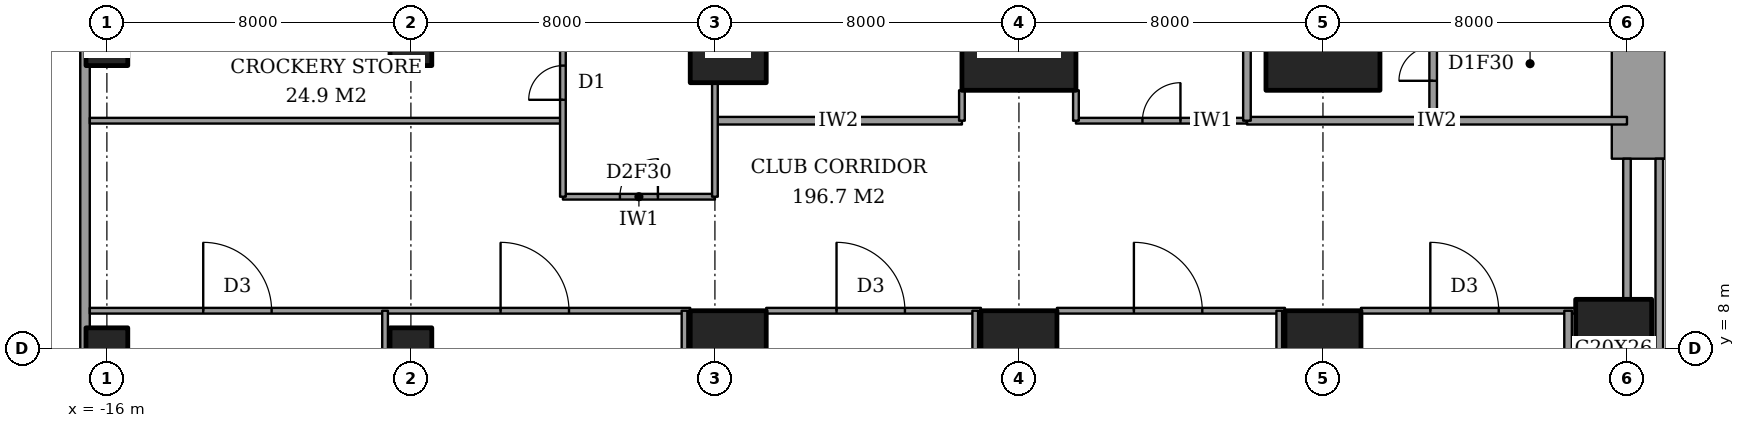
"""IFC4 building model, lengths in metres.
Left out: names, types, materials, properties, quantities, classifications, styles, units other than length and angle.
Written with IfcOpenShell. Run it as: python <this file> out.ifc"""

import sys

from ifc_helpers import new_model, si_unit, direction, frame, frame_2d, origin, origin_2d, place, context, subcontext, project, spatial, rectangle, extrude, element, fill, save


model = new_model("IFC4")
c1 = context("Model", 3, precision=1e-05, world=origin(), true_north=direction((0.0, 1.0)))
c2 = subcontext(c1, "Body", "Model", "MODEL_VIEW")
j1 = project(units=[si_unit("LENGTHUNIT", "METRE"), si_unit("PLANEANGLEUNIT", "RADIAN")], contexts=[c1])
p1 = place(None, origin())
s1 = spatial("IfcSite", under=j1, at=p1, CompositionType="ELEMENT")
p2 = place(p1, origin())
s2 = spatial("IfcBuilding", under=s1, at=p2, CompositionType="ELEMENT")
p3 = place(p2, frame((0.0, 0.0, 6.0)))
s3 = spatial("IfcBuildingStorey", under=s2, at=p3, CompositionType="ELEMENT", Elevation=6.0)
for number, where, z_axis, x_axis in (
    (1, (-16.0, 8.0, 0.0), (0.0, 0.0, 1.0), (1.0, 0.0, 0.0)),
    (2, (-16.0, 16.0, 0.0), (0.0, 0.0, 1.0), (1.0, 0.0, 0.0)),
    (3, (-8.0, 8.0, 0.0), (0.0, 0.0, 1.0), (1.0, 0.0, 0.0)),
    (4, (-8.0, 16.0, 0.0), (0.0, 0.0, 1.0), (1.0, 0.0, 0.0)),
):
    element("IfcColumn", number, at=place(p3, frame(where, z_axis=z_axis, x_axis=x_axis)), inside=s3, PredefinedType="COLUMN", context=c2, shape_type="SweptSolid", body=[
        extrude(rectangle(XDim=1.1, YDim=1.1, at=origin_2d()), origin(), (0.0, 0.0, 1.0), 5.0),
    ])
for number, where, z_axis, x_axis in (
    (5, (0.35, 8.0, 0.0), (0.0, 0.0, 1.0), (1.0, 0.0, 0.0)),
    (6, (0.35, 16.0, 0.0), (0.0, 0.0, 1.0), (1.0, 0.0, 0.0)),
    (7, (8.0, 8.0, 0.0), (0.0, 0.0, 1.0), (1.0, 0.0, 0.0)),
):
    element("IfcColumn", number, at=place(p3, frame(where, z_axis=z_axis, x_axis=x_axis)), inside=s3, PredefinedType="COLUMN", context=c2, shape_type="SweptSolid", body=[
        extrude(rectangle(XDim=2.0, YDim=2.0, at=origin_2d()), origin(), (0.0, 0.0, 1.0), 5.0),
    ])
p4 = place(p3, frame((8.0, 16.0, 0.0), z_axis=(0.0, 0.0, 1.0), x_axis=(1.0, 0.0, 0.0)))
e8 = element("IfcColumn", 8, at=p4, inside=s3, PredefinedType="COLUMN", context=c2, shape_type="SweptSolid", body=[
    extrude(rectangle(XDim=3.0, YDim=2.4, at=origin_2d()), origin(), (0.0, 0.0, 1.0), 5.0),
])
p5 = place(p3, frame((16.0, 8.0, 0.0), z_axis=(0.0, 0.0, 1.0), x_axis=(1.0, 0.0, 0.0)))
e9 = element("IfcColumn", 9, at=p5, inside=s3, PredefinedType="COLUMN", context=c2, shape_type="SweptSolid", body=[
    extrude(rectangle(XDim=2.0, YDim=2.0, at=origin_2d()), origin(), (0.0, 0.0, 1.0), 5.0),
])
p6 = place(p3, frame((16.0, 16.0, 0.0), z_axis=(0.0, 0.0, 1.0), x_axis=(1.0, 0.0, 0.0)))
e10 = element("IfcColumn", 10, at=p6, inside=s3, PredefinedType="COLUMN", context=c2, shape_type="SweptSolid", body=[
    extrude(rectangle(XDim=3.0, YDim=2.4, at=origin_2d()), origin(), (0.0, 0.0, 1.0), 5.0),
])
p7 = place(p3, frame((23.65, 8.0, 0.0), z_axis=(0.0, 0.0, 1.0), x_axis=(1.0, 0.0, 0.0)))
e11 = element("IfcColumn", 11, at=p7, inside=s3, PredefinedType="COLUMN", context=c2, shape_type="SweptSolid", body=[
    extrude(rectangle(XDim=2.0, YDim=2.6, at=origin_2d()), origin(), (0.0, 0.0, 1.0), 5.0),
])
p8 = place(p3, frame((24.3, 13.0, 0.0), z_axis=(0.0, 0.0, 1.0), x_axis=(0.0, 1.0, 0.0)))
e12 = element("IfcWall", 12, at=p8, inside=s3, PredefinedType="SHEAR", context=c2, shape_type="SweptSolid", body=[
    extrude(rectangle(XDim=10.15, YDim=1.4, at=frame_2d((5.075, 0.0))), origin(), (0.0, 0.0, 1.0), 5.0),
])
p9 = place(p3, frame((-16.575, 56.575, 0.0), z_axis=(0.0, 0.0, 1.0), x_axis=(0.0, -1.0, 0.0)))
e13 = element("IfcWall", 13, at=p9, inside=s3, PredefinedType="SOLIDWALL", context=c2, shape_type="SweptSolid", body=[
    extrude(rectangle(XDim=73.15, YDim=0.25, at=frame_2d((36.575, 0.0))), origin(), (0.0, 0.0, 1.0), 5.0),
])
p10 = place(p3, frame((-16.45, 9.0, 0.0), z_axis=(0.0, 0.0, 1.0), x_axis=(1.0, 0.0, 0.0)))
e14 = element("IfcWall", 14, at=p10, inside=s3, PredefinedType="PARTITIONING", context=c2, shape_type="SweptSolid", body=[
    extrude(rectangle(XDim=15.8, YDim=0.15, at=frame_2d((7.9, 0.0))), origin(), (0.0, 0.0, 1.0), 4.7),
])
p11 = place(p10, frame((2.985, 0.0, 0.0)))
e15 = element("IfcOpeningElement", 15, at=p11, cuts=e14, PredefinedType="OPENING", context=c2, shape_type="SweptSolid", body=[
    extrude(rectangle(XDim=1.8, YDim=2.1, at=frame_2d((0.9, 1.05))), frame((0.0, 0.085, 0.0), z_axis=(0.0, -1.0, 0.0), x_axis=(1.0, 0.0, 0.0)), (0.0, 0.0, 1.0), 0.17),
])
p12 = place(p10, frame((10.81, 0.0, 0.0)))
e16 = element("IfcOpeningElement", 16, at=p12, cuts=e14, PredefinedType="OPENING", context=c2, shape_type="SweptSolid", body=[
    extrude(rectangle(XDim=1.8, YDim=2.1, at=frame_2d((0.9, 1.05))), frame((0.0, 0.085, 0.0), z_axis=(0.0, -1.0, 0.0), x_axis=(1.0, 0.0, 0.0)), (0.0, 0.0, 1.0), 0.17),
])
p13 = place(p3, frame((1.35, 9.0, 0.0), z_axis=(0.0, 0.0, 1.0), x_axis=(1.0, 0.0, 0.0)))
e17 = element("IfcWall", 17, at=p13, inside=s3, PredefinedType="PARTITIONING", context=c2, shape_type="SweptSolid", body=[
    extrude(rectangle(XDim=5.65, YDim=0.15, at=frame_2d((2.825, 0.0))), origin(), (0.0, 0.0, 1.0), 4.7),
])
p14 = place(p13, frame((1.85, 0.0, 0.0)))
e18 = element("IfcOpeningElement", 18, at=p14, cuts=e17, PredefinedType="OPENING", context=c2, shape_type="SweptSolid", body=[
    extrude(rectangle(XDim=1.8, YDim=2.1, at=frame_2d((0.9, 1.05))), frame((0.0, 0.085, 0.0), z_axis=(0.0, -1.0, 0.0), x_axis=(1.0, 0.0, 0.0)), (0.0, 0.0, 1.0), 0.17),
])
p15 = place(p3, frame((9.0, 9.0, 0.0), z_axis=(0.0, 0.0, 1.0), x_axis=(1.0, 0.0, 0.0)))
e19 = element("IfcWall", 19, at=p15, inside=s3, PredefinedType="PARTITIONING", context=c2, shape_type="SweptSolid", body=[
    extrude(rectangle(XDim=6.0, YDim=0.15, at=frame_2d((3.0, 0.0))), origin(), (0.0, 0.0, 1.0), 4.7),
])
p16 = place(p15, frame((2.025, 0.0, 0.0)))
e20 = element("IfcOpeningElement", 20, at=p16, cuts=e19, PredefinedType="OPENING", context=c2, shape_type="SweptSolid", body=[
    extrude(rectangle(XDim=1.8, YDim=2.1, at=frame_2d((0.9, 1.05))), frame((0.0, 0.085, 0.0), z_axis=(0.0, -1.0, 0.0), x_axis=(1.0, 0.0, 0.0)), (0.0, 0.0, 1.0), 0.17),
])
p17 = place(p3, frame((17.0, 9.0, 0.0), z_axis=(0.0, 0.0, 1.0), x_axis=(1.0, 0.0, 0.0)))
e21 = element("IfcWall", 21, at=p17, inside=s3, PredefinedType="PARTITIONING", context=c2, shape_type="SweptSolid", body=[
    extrude(rectangle(XDim=5.65, YDim=0.15, at=frame_2d((2.825, 0.0))), origin(), (0.0, 0.0, 1.0), 4.7),
])
p18 = place(p17, frame((1.825, 0.0, 0.0)))
e22 = element("IfcOpeningElement", 22, at=p18, cuts=e21, PredefinedType="OPENING", context=c2, shape_type="SweptSolid", body=[
    extrude(rectangle(XDim=1.8, YDim=2.1, at=frame_2d((0.9, 1.05))), frame((0.0, 0.085, 0.0), z_axis=(0.0, -1.0, 0.0), x_axis=(1.0, 0.0, 0.0)), (0.0, 0.0, 1.0), 0.17),
])
p19 = place(p3, frame((-4.0, 12.0, 0.0), z_axis=(0.0, 0.0, 1.0), x_axis=(1.0, 0.0, 0.0)))
e23 = element("IfcWall", 23, at=p19, inside=s3, PredefinedType="PARTITIONING", context=c2, shape_type="SweptSolid", body=[
    extrude(rectangle(XDim=4.0, YDim=0.15, at=frame_2d((2.0, 0.0))), origin(), (0.0, 0.0, 1.0), 4.7),
])
p20 = place(p19, frame((1.5, 0.0, 0.0)))
e24 = element("IfcOpeningElement", 24, at=p20, cuts=e23, PredefinedType="OPENING", context=c2, shape_type="SweptSolid", body=[
    extrude(rectangle(XDim=1.0, YDim=2.1, at=frame_2d((0.5, 1.05))), frame((0.0, 0.085, 0.0), z_axis=(0.0, -1.0, 0.0), x_axis=(1.0, 0.0, 0.0)), (0.0, 0.0, 1.0), 0.17),
])
p21 = place(p3, frame((0.0, 14.0, 0.0), z_axis=(0.0, 0.0, 1.0), x_axis=(1.0, 0.0, 0.0)))
e25 = element("IfcWall", 25, at=p21, inside=s3, PredefinedType="PARTITIONING", context=c2, shape_type="SweptSolid", body=[
    extrude(rectangle(XDim=6.5, YDim=0.2, at=frame_2d((3.25, 0.0))), origin(), (0.0, 0.0, 1.0), 4.7),
])
p22 = place(p3, frame((14.0, 14.0, 0.0), z_axis=(0.0, 0.0, 1.0), x_axis=(1.0, 0.0, 0.0)))
e26 = element("IfcWall", 26, at=p22, inside=s3, PredefinedType="PARTITIONING", context=c2, shape_type="SweptSolid", body=[
    extrude(rectangle(XDim=10.0, YDim=0.2, at=frame_2d((5.0, 0.0))), origin(), (0.0, 0.0, 1.0), 4.7),
])
p23 = place(p3, frame((-16.45, 14.0, 0.0), z_axis=(0.0, 0.0, 1.0), x_axis=(1.0, 0.0, 0.0)))
e27 = element("IfcWall", 27, at=p23, inside=s3, PredefinedType="PARTITIONING", context=c2, shape_type="SweptSolid", body=[
    extrude(rectangle(XDim=12.45, YDim=0.15, at=frame_2d((6.225, 0.0))), origin(), (0.0, 0.0, 1.0), 4.7),
])
p24 = place(p3, frame((9.5, 14.0, 0.0), z_axis=(0.0, 0.0, 1.0), x_axis=(1.0, 0.0, 0.0)))
e28 = element("IfcWall", 28, at=p24, inside=s3, PredefinedType="PARTITIONING", context=c2, shape_type="SweptSolid", body=[
    extrude(rectangle(XDim=4.5, YDim=0.15, at=frame_2d((2.25, 0.0))), origin(), (0.0, 0.0, 1.0), 4.7),
])
p25 = place(p24, frame((1.75, 0.0, 0.0)))
e29 = element("IfcOpeningElement", 29, at=p25, cuts=e28, PredefinedType="OPENING", context=c2, shape_type="SweptSolid", body=[
    extrude(rectangle(XDim=1.0, YDim=2.1, at=frame_2d((0.5, 1.05))), frame((0.0, 0.085, 0.0), z_axis=(0.0, -1.0, 0.0), x_axis=(1.0, 0.0, 0.0)), (0.0, 0.0, 1.0), 0.17),
])
p26 = place(p3, frame((-8.68, -16.561, 0.0), z_axis=(0.0, 0.0, 1.0), x_axis=(0.0, 1.0, 0.0)))
e30 = element("IfcWall", 30, at=p26, inside=s3, PredefinedType="PARTITIONING", context=c2, shape_type="SweptSolid", body=[
    extrude(rectangle(XDim=25.561, YDim=0.15, at=frame_2d((12.781, 0.0))), origin(), (0.0, 0.0, 1.0), 4.7),
])
p27 = place(p3, frame((-4.0, 12.0, 0.0), z_axis=(0.0, 0.0, 1.0), x_axis=(0.0, 1.0, 0.0)))
e31 = element("IfcWall", 31, at=p27, inside=s3, PredefinedType="PARTITIONING", context=c2, shape_type="SweptSolid", body=[
    extrude(rectangle(XDim=36.25, YDim=0.15, at=frame_2d((18.125, 0.0))), origin(), (0.0, 0.0, 1.0), 4.7),
])
p28 = place(p27, frame((2.55, 0.0, 0.0)))
e32 = element("IfcOpeningElement", 32, at=p28, cuts=e31, PredefinedType="OPENING", context=c2, shape_type="SweptSolid", body=[
    extrude(rectangle(XDim=0.9, YDim=2.1, at=frame_2d((0.45, 1.05))), frame((0.0, 0.085, 0.0), z_axis=(0.0, -1.0, 0.0), x_axis=(1.0, 0.0, 0.0)), (0.0, 0.0, 1.0), 0.17),
])
p29 = place(p27, frame((7.55, 0.0, 0.0)))
e33 = element("IfcOpeningElement", 33, at=p29, cuts=e31, PredefinedType="OPENING", context=c2, shape_type="SweptSolid", body=[
    extrude(rectangle(XDim=0.9, YDim=2.1, at=frame_2d((0.45, 1.05))), frame((0.0, 0.085, 0.0), z_axis=(0.0, -1.0, 0.0), x_axis=(1.0, 0.0, 0.0)), (0.0, 0.0, 1.0), 0.17),
])
p30 = place(p27, frame((15.55, 0.0, 0.0)))
e34 = element("IfcOpeningElement", 34, at=p30, cuts=e31, PredefinedType="OPENING", context=c2, shape_type="SweptSolid", body=[
    extrude(rectangle(XDim=0.9, YDim=2.1, at=frame_2d((0.45, 1.05))), frame((0.0, 0.085, 0.0), z_axis=(0.0, -1.0, 0.0), x_axis=(1.0, 0.0, 0.0)), (0.0, 0.0, 1.0), 0.17),
])
p31 = place(p27, frame((23.55, 0.0, 0.0)))
e35 = element("IfcOpeningElement", 35, at=p31, cuts=e31, PredefinedType="OPENING", context=c2, shape_type="SweptSolid", body=[
    extrude(rectangle(XDim=0.9, YDim=2.1, at=frame_2d((0.45, 1.05))), frame((0.0, 0.085, 0.0), z_axis=(0.0, -1.0, 0.0), x_axis=(1.0, 0.0, 0.0)), (0.0, 0.0, 1.0), 0.17),
])
p32 = place(p27, frame((31.55, 0.0, 0.0)))
e36 = element("IfcOpeningElement", 36, at=p32, cuts=e31, PredefinedType="OPENING", context=c2, shape_type="SweptSolid", body=[
    extrude(rectangle(XDim=0.9, YDim=2.1, at=frame_2d((0.45, 1.05))), frame((0.0, 0.085, 0.0), z_axis=(0.0, -1.0, 0.0), x_axis=(1.0, 0.0, 0.0)), (0.0, 0.0, 1.0), 0.17),
])
p33 = place(p3, frame((-0.8, -16.561, 0.0), z_axis=(0.0, 0.0, 1.0), x_axis=(0.0, 1.0, 0.0)))
e37 = element("IfcWall", 37, at=p33, inside=s3, PredefinedType="PARTITIONING", context=c2, shape_type="SweptSolid", body=[
    extrude(rectangle(XDim=25.561, YDim=0.15, at=frame_2d((12.781, 0.0))), origin(), (0.0, 0.0, 1.0), 4.7),
])
p34 = place(p3, frame((0.0, 12.0, 0.0), z_axis=(0.0, 0.0, 1.0), x_axis=(0.0, 1.0, 0.0)))
e38 = element("IfcWall", 38, at=p34, inside=s3, PredefinedType="PARTITIONING", context=c2, shape_type="SweptSolid", body=[
    extrude(rectangle(XDim=3.0, YDim=0.15, at=frame_2d((1.5, 0.0))), origin(), (0.0, 0.0, 1.0), 3.3),
])
p35 = place(p3, frame((6.5, 14.0, 0.0), z_axis=(0.0, 0.0, 1.0), x_axis=(0.0, 1.0, 0.0)))
e39 = element("IfcWall", 39, at=p35, inside=s3, PredefinedType="PARTITIONING", context=c2, shape_type="SweptSolid", body=[
    extrude(rectangle(XDim=0.8, YDim=0.15, at=frame_2d((0.4, 0.0))), origin(), (0.0, 0.0, 1.0), 4.7),
])
p36 = place(p3, frame((6.85, -16.561, 0.0), z_axis=(0.0, 0.0, 1.0), x_axis=(0.0, 1.0, 0.0)))
e40 = element("IfcWall", 40, at=p36, inside=s3, PredefinedType="PARTITIONING", context=c2, shape_type="SweptSolid", body=[
    extrude(rectangle(XDim=25.561, YDim=0.15, at=frame_2d((12.781, 0.0))), origin(), (0.0, 0.0, 1.0), 4.7),
])
p37 = place(p3, frame((9.5, 14.0, 0.0), z_axis=(0.0, 0.0, 1.0), x_axis=(0.0, 1.0, 0.0)))
e41 = element("IfcWall", 41, at=p37, inside=s3, PredefinedType="PARTITIONING", context=c2, shape_type="SweptSolid", body=[
    extrude(rectangle(XDim=0.8, YDim=0.15, at=frame_2d((0.4, 0.0))), origin(), (0.0, 0.0, 1.0), 4.7),
])
p38 = place(p3, frame((14.0, 14.0, 0.0), z_axis=(0.0, 0.0, 1.0), x_axis=(0.0, 1.0, 0.0)))
e42 = element("IfcWall", 42, at=p38, inside=s3, PredefinedType="PARTITIONING", context=c2, shape_type="SweptSolid", body=[
    extrude(rectangle(XDim=9.0, YDim=0.2, at=frame_2d((4.5, 0.0))), origin(), (0.0, 0.0, 1.0), 4.7),
])
p39 = place(p38, frame((4.0, 0.0, 0.0)))
e43 = element("IfcOpeningElement", 43, at=p39, cuts=e42, PredefinedType="OPENING", context=c2, shape_type="SweptSolid", body=[
    extrude(rectangle(XDim=1.0, YDim=2.1, at=frame_2d((0.5, 1.05))), frame((0.0, 0.11, 0.0), z_axis=(0.0, -1.0, 0.0), x_axis=(1.0, 0.0, 0.0)), (0.0, 0.0, 1.0), 0.22),
])
p40 = place(p3, frame((14.85, -16.561, 0.0), z_axis=(0.0, 0.0, 1.0), x_axis=(0.0, 1.0, 0.0)))
e44 = element("IfcWall", 44, at=p40, inside=s3, PredefinedType="PARTITIONING", context=c2, shape_type="SweptSolid", body=[
    extrude(rectangle(XDim=25.561, YDim=0.15, at=frame_2d((12.781, 0.0))), origin(), (0.0, 0.0, 1.0), 4.7),
])
p41 = place(p3, frame((18.9, 14.0, 0.0), z_axis=(0.0, 0.0, 1.0), x_axis=(0.0, 1.0, 0.0)))
e45 = element("IfcWall", 45, at=p41, inside=s3, PredefinedType="PARTITIONING", context=c2, shape_type="SweptSolid", body=[
    extrude(rectangle(XDim=6.0, YDim=0.2, at=frame_2d((3.0, 0.0))), origin(), (0.0, 0.0, 1.0), 4.7),
])
p42 = place(p41, frame((1.05, 0.0, 0.0)))
e46 = element("IfcOpeningElement", 46, at=p42, cuts=e45, PredefinedType="OPENING", context=c2, shape_type="SweptSolid", body=[
    extrude(rectangle(XDim=0.9, YDim=2.1, at=frame_2d((0.45, 1.05))), frame((0.0, 0.11, 0.0), z_axis=(0.0, -1.0, 0.0), x_axis=(1.0, 0.0, 0.0)), (0.0, 0.0, 1.0), 0.22),
])
p43 = place(p41, frame((4.05, 0.0, 0.0)))
e47 = element("IfcOpeningElement", 47, at=p43, cuts=e45, PredefinedType="OPENING", context=c2, shape_type="SweptSolid", body=[
    extrude(rectangle(XDim=0.9, YDim=2.1, at=frame_2d((0.45, 1.05))), frame((0.0, 0.11, 0.0), z_axis=(0.0, -1.0, 0.0), x_axis=(1.0, 0.0, 0.0)), (0.0, 0.0, 1.0), 0.22),
])
p44 = place(p3, frame((22.45, -16.561, 0.0), z_axis=(0.0, 0.0, 1.0), x_axis=(0.0, 1.0, 0.0)))
e48 = element("IfcWall", 48, at=p44, inside=s3, PredefinedType="PARTITIONING", context=c2, shape_type="SweptSolid", body=[
    extrude(rectangle(XDim=25.561, YDim=0.2, at=frame_2d((12.781, 0.0))), origin(), (0.0, 0.0, 1.0), 4.7),
])
p45 = place(p3, frame((24.0, 9.3, 0.0), z_axis=(0.0, 0.0, 1.0), x_axis=(0.0, 1.0, 0.0)))
e49 = element("IfcWall", 49, at=p45, inside=s3, PredefinedType="PARTITIONING", context=c2, shape_type="SweptSolid", body=[
    extrude(rectangle(XDim=3.7, YDim=0.2, at=frame_2d((1.85, 0.0))), origin(), (0.0, 0.0, 1.0), 4.7),
])
p46 = place(p3, frame((24.85, -0.45, 0.0), z_axis=(0.0, 0.0, 1.0), x_axis=(0.0, 1.0, 0.0)))
e50 = element("IfcWall", 50, at=p46, inside=s3, PredefinedType="PARTITIONING", context=c2, shape_type="SweptSolid", body=[
    extrude(rectangle(XDim=13.45, YDim=0.2, at=frame_2d((6.725, 0.0))), origin(), (0.0, 0.0, 1.0), 4.7),
])
p47 = place(p20, origin())
e51 = element("IfcDoor", 51, at=p47, inside=s3, OperationType="SINGLE_SWING_LEFT", PredefinedType="DOOR", context=c2, shape_type="SweptSolid", body=[
    extrude(rectangle(XDim=1.0, YDim=2.1, at=frame_2d((0.5, 1.05))), frame((0.0, 0.025, 0.0), z_axis=(0.0, -1.0, 0.0), x_axis=(1.0, 0.0, 0.0)), (0.0, 0.0, 1.0), 0.05),
])
fill(e24, e51)
p48 = place(p25, origin())
e52 = element("IfcDoor", 52, at=p48, inside=s3, OperationType="SINGLE_SWING_LEFT", PredefinedType="DOOR", context=c2, shape_type="SweptSolid", body=[
    extrude(rectangle(XDim=1.0, YDim=2.1, at=frame_2d((0.5, 1.05))), frame((0.0, 0.025, 0.0), z_axis=(0.0, -1.0, 0.0), x_axis=(1.0, 0.0, 0.0)), (0.0, 0.0, 1.0), 0.05),
])
fill(e29, e52)
p49 = place(p28, origin())
e53 = element("IfcDoor", 53, at=p49, inside=s3, OperationType="SINGLE_SWING_RIGHT", PredefinedType="DOOR", context=c2, shape_type="SweptSolid", body=[
    extrude(rectangle(XDim=0.9, YDim=2.1, at=frame_2d((0.45, 1.05))), frame((0.0, 0.025, 0.0), z_axis=(0.0, -1.0, 0.0), x_axis=(1.0, 0.0, 0.0)), (0.0, 0.0, 1.0), 0.05),
])
fill(e32, e53)
p50 = place(p11, origin())
e54 = element("IfcDoor", 54, at=p50, inside=s3, OperationType="DOUBLE_DOOR_DOUBLE_SWING", PredefinedType="DOOR", context=c2, shape_type="SweptSolid", body=[
    extrude(rectangle(XDim=1.8, YDim=2.1, at=frame_2d((0.9, 1.05))), frame((0.0, 0.025, 0.0), z_axis=(0.0, -1.0, 0.0), x_axis=(1.0, 0.0, 0.0)), (0.0, 0.0, 1.0), 0.05),
])
fill(e15, e54)
p51 = place(p12, origin())
e55 = element("IfcDoor", 55, at=p51, inside=s3, OperationType="DOUBLE_DOOR_DOUBLE_SWING", PredefinedType="DOOR", context=c2, shape_type="SweptSolid", body=[
    extrude(rectangle(XDim=1.8, YDim=2.1, at=frame_2d((0.9, 1.05))), frame((0.0, 0.025, 0.0), z_axis=(0.0, -1.0, 0.0), x_axis=(1.0, 0.0, 0.0)), (0.0, 0.0, 1.0), 0.05),
])
fill(e16, e55)
p52 = place(p14, origin())
e56 = element("IfcDoor", 56, at=p52, inside=s3, OperationType="DOUBLE_DOOR_DOUBLE_SWING", PredefinedType="DOOR", context=c2, shape_type="SweptSolid", body=[
    extrude(rectangle(XDim=1.8, YDim=2.1, at=frame_2d((0.9, 1.05))), frame((0.0, 0.025, 0.0), z_axis=(0.0, -1.0, 0.0), x_axis=(1.0, 0.0, 0.0)), (0.0, 0.0, 1.0), 0.05),
])
fill(e18, e56)
p53 = place(p16, origin())
e57 = element("IfcDoor", 57, at=p53, inside=s3, OperationType="DOUBLE_DOOR_DOUBLE_SWING", PredefinedType="DOOR", context=c2, shape_type="SweptSolid", body=[
    extrude(rectangle(XDim=1.8, YDim=2.1, at=frame_2d((0.9, 1.05))), frame((0.0, 0.025, 0.0), z_axis=(0.0, -1.0, 0.0), x_axis=(1.0, 0.0, 0.0)), (0.0, 0.0, 1.0), 0.05),
])
fill(e20, e57)
p54 = place(p18, origin())
e58 = element("IfcDoor", 58, at=p54, inside=s3, OperationType="DOUBLE_DOOR_DOUBLE_SWING", PredefinedType="DOOR", context=c2, shape_type="SweptSolid", body=[
    extrude(rectangle(XDim=1.8, YDim=2.1, at=frame_2d((0.9, 1.05))), frame((0.0, 0.025, 0.0), z_axis=(0.0, -1.0, 0.0), x_axis=(1.0, 0.0, 0.0)), (0.0, 0.0, 1.0), 0.05),
])
fill(e22, e58)
p55 = place(p42, origin())
e59 = element("IfcDoor", 59, at=p55, inside=s3, OperationType="SINGLE_SWING_RIGHT", PredefinedType="DOOR", context=c2, shape_type="SweptSolid", body=[
    extrude(rectangle(XDim=0.9, YDim=2.1, at=frame_2d((0.45, 1.05))), frame((0.0, 0.025, 0.0), z_axis=(0.0, -1.0, 0.0), x_axis=(1.0, 0.0, 0.0)), (0.0, 0.0, 1.0), 0.05),
])
fill(e46, e59)
save(model, sys.argv[1])
